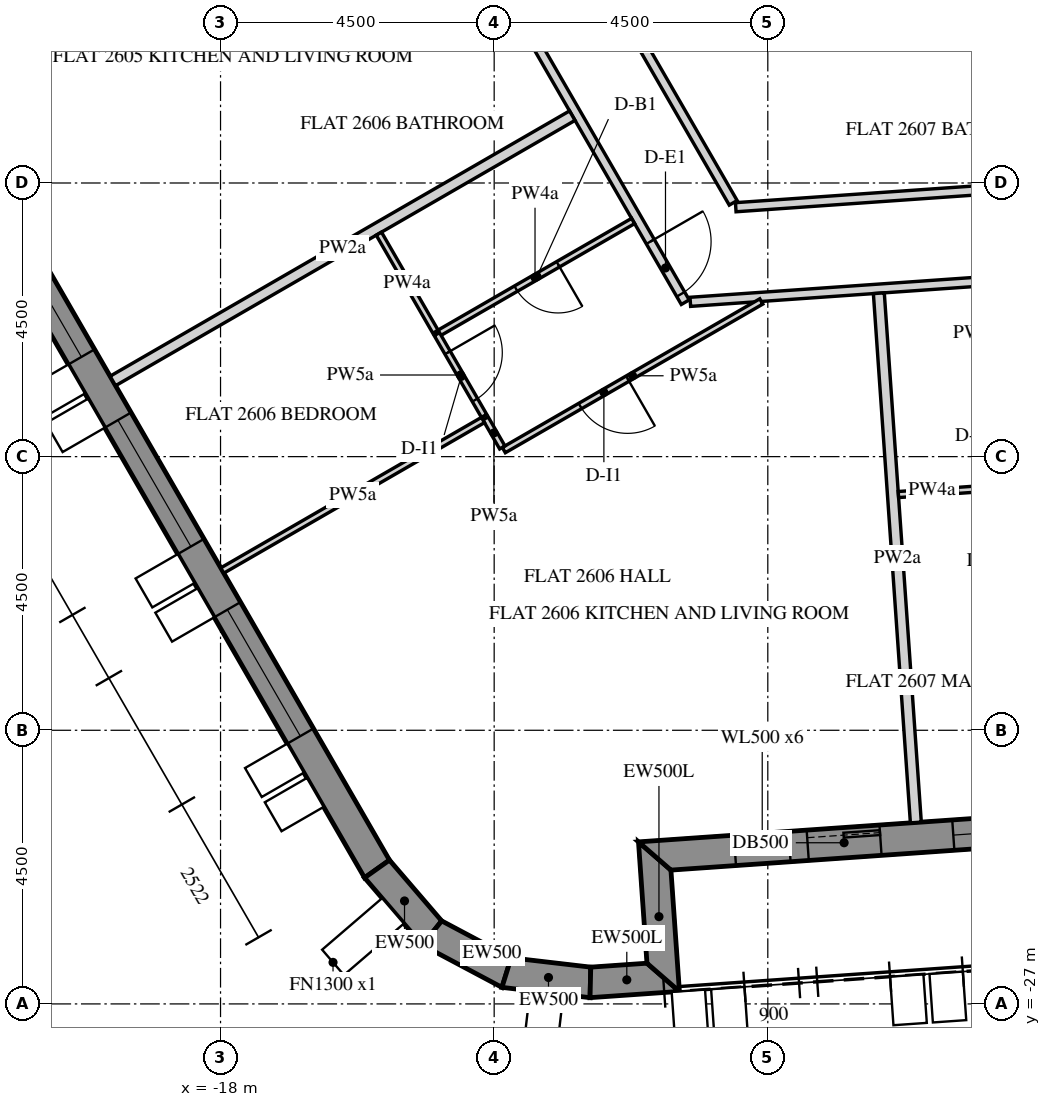
"""IFC4 building model, lengths in metres.
Left out: names, types, materials, properties, quantities, classifications, styles, units other than length and angle.
Written with IfcOpenShell. Run it as: python <this file> out.ifc"""

import sys

from ifc_helpers import new_model, si_unit, direction, frame, frame_2d, origin, place, context, subcontext, project, spatial, polyline, rectangle, outline, extrude, element, fill, save


model = new_model("IFC4")
c1 = context("Model", 3, precision=1e-05, world=origin(), true_north=direction((0.0, 1.0)))
c2 = subcontext(c1, "Body", "Model", "MODEL_VIEW")
j1 = project(units=[si_unit("LENGTHUNIT", "METRE"), si_unit("PLANEANGLEUNIT", "RADIAN")], contexts=[c1])
p1 = place(None, origin())
s1 = spatial("IfcSite", under=j1, at=p1, CompositionType="ELEMENT")
p2 = place(p1, origin())
s2 = spatial("IfcBuilding", under=s1, at=p2, CompositionType="ELEMENT")
p3 = place(p2, frame((0.0, 0.0, 326.4)))
s3 = spatial("IfcBuildingStorey", under=s2, at=p3, CompositionType="ELEMENT", Elevation=326.4)
p4 = place(p3, frame((-28.149, -2.745, -0.15), z_axis=(0.0, 0.0, 1.0), x_axis=(0.500003737743, -0.866023245787, 0.0)))
e1 = element("IfcWall", 1, at=p4, inside=s3, PredefinedType="SOLIDWALL", context=c2, shape_type="SweptSolid", body=[
    extrude(outline(polyline([(-0.021, -0.25), (25.468, -0.25), (25.421, 0.25), (0.021, 0.25), (-0.021, -0.25)])), origin(), (0.0, 0.0, 1.0), 3.9),
])
p5 = place(p4, frame((2.522, 0.0, 0.75)))
e2 = element("IfcOpeningElement", 2, at=p5, cuts=e1, PredefinedType="OPENING", context=c2, shape_type="SweptSolid", body=[
    extrude(rectangle(XDim=2.4, YDim=2.7, at=frame_2d((1.2, 1.35))), frame((0.0, 0.26, 0.0), z_axis=(0.0, -1.0, 0.0), x_axis=(1.0, 0.0, 0.0)), (0.0, 0.0, 1.0), 0.52),
])
p6 = place(p4, frame((6.122, 0.0, 0.75)))
e3 = element("IfcOpeningElement", 3, at=p6, cuts=e1, PredefinedType="OPENING", context=c2, shape_type="SweptSolid", body=[
    extrude(rectangle(XDim=2.4, YDim=2.7, at=frame_2d((1.2, 1.35))), frame((0.0, 0.26, 0.0), z_axis=(0.0, -1.0, 0.0), x_axis=(1.0, 0.0, 0.0)), (0.0, 0.0, 1.0), 0.52),
])
p7 = place(p4, frame((9.722, 0.0, 0.75)))
e4 = element("IfcOpeningElement", 4, at=p7, cuts=e1, PredefinedType="OPENING", context=c2, shape_type="SweptSolid", body=[
    extrude(rectangle(XDim=2.4, YDim=2.7, at=frame_2d((1.2, 1.35))), frame((0.0, 0.26, 0.0), z_axis=(0.0, -1.0, 0.0), x_axis=(1.0, 0.0, 0.0)), (0.0, 0.0, 1.0), 0.52),
])
p8 = place(p4, frame((13.323, 0.0, 0.75)))
e5 = element("IfcOpeningElement", 5, at=p8, cuts=e1, PredefinedType="OPENING", context=c2, shape_type="SweptSolid", body=[
    extrude(rectangle(XDim=2.4, YDim=2.7, at=frame_2d((1.2, 1.35))), frame((0.0, 0.26, 0.0), z_axis=(0.0, -1.0, 0.0), x_axis=(1.0, 0.0, 0.0)), (0.0, 0.0, 1.0), 0.52),
])
p9 = place(p4, frame((16.922, 0.0, 0.75)))
e6 = element("IfcOpeningElement", 6, at=p9, cuts=e1, PredefinedType="OPENING", context=c2, shape_type="SweptSolid", body=[
    extrude(rectangle(XDim=2.4, YDim=2.7, at=frame_2d((1.2, 1.35))), frame((0.0, 0.26, 0.0), z_axis=(0.0, -1.0, 0.0), x_axis=(1.0, 0.0, 0.0)), (0.0, 0.0, 1.0), 0.52),
])
p10 = place(p4, frame((20.522, 0.0, 0.75)))
e7 = element("IfcOpeningElement", 7, at=p10, cuts=e1, PredefinedType="OPENING", context=c2, shape_type="SweptSolid", body=[
    extrude(rectangle(XDim=2.4, YDim=2.7, at=frame_2d((1.2, 1.35))), frame((0.0, 0.26, 0.0), z_axis=(0.0, -1.0, 0.0), x_axis=(1.0, 0.0, 0.0)), (0.0, 0.0, 1.0), 0.52),
])
p11 = place(p3, frame((-15.427, -24.78, -0.15), z_axis=(0.0, 0.0, 1.0), x_axis=(0.651616566281, -0.758548515619, 0.0)))
e8 = element("IfcWall", 8, at=p11, inside=s3, PredefinedType="SOLIDWALL", context=c2, shape_type="SweptSolid", body=[
    extrude(outline(polyline([(-0.023, -0.25), (1.435, -0.25), (1.341, 0.25), (0.023, 0.25), (-0.023, -0.25)])), origin(), (0.0, 0.0, 1.0), 3.9),
])
p12 = place(p3, frame((-14.522, -25.833, -0.15), z_axis=(0.0, 0.0, 1.0), x_axis=(0.882926676147, -0.469510899286, 0.0)))
e9 = element("IfcWall", 9, at=p12, inside=s3, PredefinedType="SOLIDWALL", context=c2, shape_type="SweptSolid", body=[
    extrude(outline(polyline([(-0.047, -0.25), (1.436, -0.25), (1.341, 0.25), (0.047, 0.25), (-0.047, -0.25)])), origin(), (0.0, 0.0, 1.0), 3.9),
])
p13 = place(p3, frame((-13.296, -26.485, -0.15), z_axis=(0.0, 0.0, 1.0), x_axis=(0.993239161627, -0.116086036245, 0.0)))
e10 = element("IfcWall", 10, at=p13, inside=s3, PredefinedType="SOLIDWALL", context=c2, shape_type="SweptSolid", body=[
    extrude(outline(polyline([(-0.047, -0.25), (1.411, -0.25), (1.365, 0.25), (0.047, 0.25), (-0.047, -0.25)])), origin(), (0.0, 0.0, 1.0), 3.9),
])
p14 = place(p3, frame((-11.917, -26.646, -0.15), z_axis=(0.0, 0.0, 1.0), x_axis=(0.997562933087, 0.069772448216, 0.0)))
e11 = element("IfcWall", 11, at=p14, inside=s3, PredefinedType="SOLIDWALL", context=c2, shape_type="SweptSolid", body=[
    extrude(outline(polyline([(-0.023, -0.25), (1.45, -0.25), (0.95, 0.25), (0.023, 0.25), (-0.023, -0.25)])), origin(), (0.0, 0.0, 1.0), 3.9),
])
p15 = place(p3, frame((-10.72, -26.562, -0.15), z_axis=(0.0, 0.0, 1.0), x_axis=(-0.069824268692, 0.99755930726, 0.0)))
e12 = element("IfcWall", 12, at=p15, inside=s3, PredefinedType="SOLIDWALL", context=c2, shape_type="SweptSolid", body=[
    extrude(outline(polyline([(-0.25, -0.25), (1.75, -0.25), (2.25, 0.25), (0.25, 0.25), (-0.25, -0.25)])), origin(), (0.0, 0.0, 1.0), 3.9),
])
p16 = place(p3, frame((-10.86, -24.567, -0.15), z_axis=(0.0, 0.0, 1.0), x_axis=(0.997564329317, 0.06975248292, 0.0)))
e13 = element("IfcWall", 13, at=p16, inside=s3, PredefinedType="SOLIDWALL", context=c2, shape_type="SweptSolid", body=[
    extrude(outline(polyline([(0.25, -0.25), (22.795, -0.25), (23.295, 0.25), (-0.25, 0.25), (0.25, -0.25)])), origin(), (0.0, 0.0, 1.0), 3.9),
])
p17 = place(p16, frame((1.323, 0.0, 1.05)))
e14 = element("IfcOpeningElement", 14, at=p17, cuts=e13, PredefinedType="OPENING", context=c2, shape_type="SweptSolid", body=[
    extrude(rectangle(XDim=0.9, YDim=1.5, at=frame_2d((0.45, 0.75))), frame((0.0, 0.26, 0.0), z_axis=(0.0, -1.0, 0.0), x_axis=(1.0, 0.0, 0.0)), (0.0, 0.0, 1.0), 0.52),
])
p18 = place(p16, frame((2.522, 0.0, 0.15)))
e15 = element("IfcOpeningElement", 15, at=p18, cuts=e13, PredefinedType="OPENING", context=c2, shape_type="SweptSolid", body=[
    extrude(rectangle(XDim=1.2, YDim=2.4, at=frame_2d((0.6, 1.2))), frame((0.0, 0.26, 0.0), z_axis=(0.0, -1.0, 0.0), x_axis=(1.0, 0.0, 0.0)), (0.0, 0.0, 1.0), 0.52),
])
p19 = place(p16, frame((4.922, 0.0, 1.05)))
e16 = element("IfcOpeningElement", 16, at=p19, cuts=e13, PredefinedType="OPENING", context=c2, shape_type="SweptSolid", body=[
    extrude(rectangle(XDim=0.9, YDim=1.5, at=frame_2d((0.45, 0.75))), frame((0.0, 0.26, 0.0), z_axis=(0.0, -1.0, 0.0), x_axis=(1.0, 0.0, 0.0)), (0.0, 0.0, 1.0), 0.52),
])
p20 = place(p16, frame((6.122, 0.0, 0.15)))
e17 = element("IfcOpeningElement", 17, at=p20, cuts=e13, PredefinedType="OPENING", context=c2, shape_type="SweptSolid", body=[
    extrude(rectangle(XDim=1.2, YDim=2.4, at=frame_2d((0.6, 1.2))), frame((0.0, 0.26, 0.0), z_axis=(0.0, -1.0, 0.0), x_axis=(1.0, 0.0, 0.0)), (0.0, 0.0, 1.0), 0.52),
])
p21 = place(p16, frame((8.522, 0.0, 1.05)))
e18 = element("IfcOpeningElement", 18, at=p21, cuts=e13, PredefinedType="OPENING", context=c2, shape_type="SweptSolid", body=[
    extrude(rectangle(XDim=0.9, YDim=1.5, at=frame_2d((0.45, 0.75))), frame((0.0, 0.26, 0.0), z_axis=(0.0, -1.0, 0.0), x_axis=(1.0, 0.0, 0.0)), (0.0, 0.0, 1.0), 0.52),
])
p22 = place(p16, frame((9.722, 0.0, 0.15)))
e19 = element("IfcOpeningElement", 19, at=p22, cuts=e13, PredefinedType="OPENING", context=c2, shape_type="SweptSolid", body=[
    extrude(rectangle(XDim=1.2, YDim=2.4, at=frame_2d((0.6, 1.2))), frame((0.0, 0.26, 0.0), z_axis=(0.0, -1.0, 0.0), x_axis=(1.0, 0.0, 0.0)), (0.0, 0.0, 1.0), 0.52),
])
p23 = place(p16, frame((12.122, 0.0, 1.05)))
e20 = element("IfcOpeningElement", 20, at=p23, cuts=e13, PredefinedType="OPENING", context=c2, shape_type="SweptSolid", body=[
    extrude(rectangle(XDim=0.9, YDim=1.5, at=frame_2d((0.45, 0.75))), frame((0.0, 0.26, 0.0), z_axis=(0.0, -1.0, 0.0), x_axis=(1.0, 0.0, 0.0)), (0.0, 0.0, 1.0), 0.52),
])
p24 = place(p16, frame((13.323, 0.0, 0.15)))
e21 = element("IfcOpeningElement", 21, at=p24, cuts=e13, PredefinedType="OPENING", context=c2, shape_type="SweptSolid", body=[
    extrude(rectangle(XDim=1.2, YDim=2.4, at=frame_2d((0.6, 1.2))), frame((0.0, 0.26, 0.0), z_axis=(0.0, -1.0, 0.0), x_axis=(1.0, 0.0, 0.0)), (0.0, 0.0, 1.0), 0.52),
])
p25 = place(p16, frame((15.722, 0.0, 1.05)))
e22 = element("IfcOpeningElement", 22, at=p25, cuts=e13, PredefinedType="OPENING", context=c2, shape_type="SweptSolid", body=[
    extrude(rectangle(XDim=0.9, YDim=1.5, at=frame_2d((0.45, 0.75))), frame((0.0, 0.26, 0.0), z_axis=(0.0, -1.0, 0.0), x_axis=(1.0, 0.0, 0.0)), (0.0, 0.0, 1.0), 0.52),
])
p26 = place(p16, frame((16.922, 0.0, 0.15)))
e23 = element("IfcOpeningElement", 23, at=p26, cuts=e13, PredefinedType="OPENING", context=c2, shape_type="SweptSolid", body=[
    extrude(rectangle(XDim=1.2, YDim=2.4, at=frame_2d((0.6, 1.2))), frame((0.0, 0.26, 0.0), z_axis=(0.0, -1.0, 0.0), x_axis=(1.0, 0.0, 0.0)), (0.0, 0.0, 1.0), 0.52),
])
p27 = place(p16, frame((19.323, 0.0, 1.05)))
e24 = element("IfcOpeningElement", 24, at=p27, cuts=e13, PredefinedType="OPENING", context=c2, shape_type="SweptSolid", body=[
    extrude(rectangle(XDim=0.9, YDim=1.5, at=frame_2d((0.45, 0.75))), frame((0.0, 0.26, 0.0), z_axis=(0.0, -1.0, 0.0), x_axis=(1.0, 0.0, 0.0)), (0.0, 0.0, 1.0), 0.52),
])
p28 = place(p16, frame((20.522, 0.0, 0.15)))
e25 = element("IfcOpeningElement", 25, at=p28, cuts=e13, PredefinedType="OPENING", context=c2, shape_type="SweptSolid", body=[
    extrude(rectangle(XDim=1.2, YDim=2.4, at=frame_2d((0.6, 1.2))), frame((0.0, 0.26, 0.0), z_axis=(0.0, -1.0, 0.0), x_axis=(1.0, 0.0, 0.0)), (0.0, 0.0, 1.0), 0.52),
])
p29 = place(p3, frame((-17.696, -2.749, 0.0), z_axis=(0.0, 0.0, 1.0), x_axis=(0.499997948852, -0.866026588012, 0.0)))
e26 = element("IfcWall", 26, at=p29, inside=s3, PredefinedType="PARTITIONING", context=c2, shape_type="SweptSolid", body=[
    extrude(rectangle(XDim=14.677, YDim=0.15, at=frame_2d((7.339, 0.0))), origin(), (0.0, 0.0, 1.0), 2.838),
])
p30 = place(p29, frame((0.4, 0.0, 0.0)))
e27 = element("IfcOpeningElement", 27, at=p30, cuts=e26, PredefinedType="OPENING", context=c2, shape_type="SweptSolid", body=[
    extrude(rectangle(XDim=1.0, YDim=2.1, at=frame_2d((0.5, 1.05))), frame((0.0, 0.085, 0.0), z_axis=(0.0, -1.0, 0.0), x_axis=(1.0, 0.0, 0.0)), (0.0, 0.0, 1.0), 0.17),
])
p31 = place(p29, frame((13.527, 0.0, 0.0)))
e28 = element("IfcOpeningElement", 28, at=p31, cuts=e26, PredefinedType="OPENING", context=c2, shape_type="SweptSolid", body=[
    extrude(rectangle(XDim=1.0, YDim=2.1, at=frame_2d((0.5, 1.05))), frame((0.0, 0.085, 0.0), z_axis=(0.0, -1.0, 0.0), x_axis=(1.0, 0.0, 0.0)), (0.0, 0.0, 1.0), 0.17),
])
p32 = place(p3, frame((-10.274, -15.454, 0.0), z_axis=(0.0, 0.0, 1.0), x_axis=(0.997563645223, 0.069762265797, 0.0)))
e29 = element("IfcWall", 29, at=p32, inside=s3, PredefinedType="PARTITIONING", context=c2, shape_type="SweptSolid", body=[
    extrude(rectangle(XDim=16.606, YDim=0.15, at=frame_2d((8.303, 0.0))), origin(), (0.0, 0.0, 1.0), 2.838),
])
p33 = place(p32, frame((6.103, 0.0, 0.0)))
e30 = element("IfcOpeningElement", 30, at=p33, cuts=e29, PredefinedType="OPENING", context=c2, shape_type="SweptSolid", body=[
    extrude(rectangle(XDim=1.0, YDim=2.1, at=frame_2d((0.5, 1.05))), frame((0.0, 0.085, 0.0), z_axis=(0.0, -1.0, 0.0), x_axis=(1.0, 0.0, 0.0)), (0.0, 0.0, 1.0), 0.17),
])
p34 = place(p3, frame((6.717, -12.762, 0.0), z_axis=(0.0, 0.0, 1.0), x_axis=(-0.99756375843, -0.069760646978, 0.0)))
e31 = element("IfcWall", 31, at=p34, inside=s3, PredefinedType="PARTITIONING", context=c2, shape_type="SweptSolid", body=[
    extrude(rectangle(XDim=16.284, YDim=0.15, at=frame_2d((8.142, 0.0))), origin(), (0.0, 0.0, 1.0), 2.838),
])
p35 = place(p34, frame((7.692, 0.0, 0.0)))
e32 = element("IfcOpeningElement", 32, at=p35, cuts=e31, PredefinedType="OPENING", context=c2, shape_type="SweptSolid", body=[
    extrude(rectangle(XDim=0.9, YDim=2.1, at=frame_2d((0.45, 1.05))), frame((0.0, 0.085, 0.0), z_axis=(0.0, -1.0, 0.0), x_axis=(1.0, 0.0, 0.0)), (0.0, 0.0, 1.0), 0.17),
])
p36 = place(p3, frame((-9.569, -13.826, 0.0), z_axis=(0.0, 0.0, 1.0), x_axis=(-0.500017101833, 0.866015529811, 0.0)))
e33 = element("IfcWall", 33, at=p36, inside=s3, PredefinedType="PARTITIONING", context=c2, shape_type="SweptSolid", body=[
    extrude(rectangle(XDim=6.168, YDim=0.15, at=frame_2d((3.084, 0.0))), origin(), (0.0, 0.0, 1.0), 2.838),
])
p37 = place(p3, frame((-19.771, -16.755, 0.0), z_axis=(0.0, 0.0, 1.0), x_axis=(0.866025292695, 0.500000192413, 0.0)))
e34 = element("IfcWall", 34, at=p37, inside=s3, PredefinedType="PARTITIONING", context=c2, shape_type="SweptSolid", body=[
    extrude(rectangle(XDim=8.725, YDim=0.18, at=frame_2d((4.363, 0.0))), origin(), (0.0, 0.0, 1.0), 2.838),
])
p38 = place(p3, frame((-9.107, -15.448, 0.0), z_axis=(0.0, 0.0, 1.0), x_axis=(-0.866025094983, -0.500000534859, 0.0)))
e35 = element("IfcWall", 35, at=p38, inside=s3, PredefinedType="PARTITIONING", context=c2, shape_type="SweptSolid", body=[
    extrude(rectangle(XDim=4.889, YDim=0.1, at=frame_2d((2.445, 0.0))), origin(), (0.0, 0.0, 1.0), 2.838),
])
p39 = place(p38, frame((2.539, 0.0, 0.0)))
e36 = element("IfcOpeningElement", 36, at=p39, cuts=e35, PredefinedType="OPENING", context=c2, shape_type="SweptSolid", body=[
    extrude(rectangle(XDim=0.9, YDim=2.1, at=frame_2d((0.45, 1.05))), frame((0.0, 0.06, 0.0), z_axis=(0.0, -1.0, 0.0), x_axis=(1.0, 0.0, 0.0)), (0.0, 0.0, 1.0), 0.12),
])
p40 = place(p3, frame((-13.366, -17.849, 0.0), z_axis=(0.0, 0.0, 1.0), x_axis=(-0.499850094852, 0.866111934265, 0.0)))
e37 = element("IfcWall", 37, at=p40, inside=s3, PredefinedType="PARTITIONING", context=c2, shape_type="SweptSolid", body=[
    extrude(rectangle(XDim=0.552, YDim=0.1, at=frame_2d((0.276, 0.0))), origin(), (0.0, 0.0, 1.0), 2.838),
])
p41 = place(p3, frame((-13.684, -17.398, 0.0), z_axis=(0.0, 0.0, 1.0), x_axis=(-0.866040211805, -0.499974350878, 0.0)))
e38 = element("IfcWall", 38, at=p41, inside=s3, PredefinedType="PARTITIONING", context=c2, shape_type="SweptSolid", body=[
    extrude(rectangle(XDim=4.95, YDim=0.1, at=frame_2d((2.475, 0.0))), origin(), (0.0, 0.0, 1.0), 2.838),
])
p42 = place(p3, frame((-6.565, -24.017, 0.0), z_axis=(0.0, 0.0, 1.0), x_axis=(-0.06975756604, 0.997563973878, 0.0)))
e39 = element("IfcWall", 39, at=p42, inside=s3, PredefinedType="PARTITIONING", context=c2, shape_type="SweptSolid", body=[
    extrude(rectangle(XDim=8.725, YDim=0.18, at=frame_2d((4.363, 0.0))), origin(), (0.0, 0.0, 1.0), 2.838),
])
p43 = place(p3, frame((-11.215, -14.125, 0.0), z_axis=(0.0, 0.0, 1.0), x_axis=(-0.866028424924, -0.499994767197, 0.0)))
e40 = element("IfcWall", 40, at=p43, inside=s3, PredefinedType="PARTITIONING", context=c2, shape_type="SweptSolid", body=[
    extrude(rectangle(XDim=3.725, YDim=0.1, at=frame_2d((1.863, 0.0))), origin(), (0.0, 0.0, 1.0), 2.838),
])
p44 = place(p43, frame((1.425, 0.0, 0.0)))
e41 = element("IfcOpeningElement", 41, at=p44, cuts=e40, PredefinedType="OPENING", context=c2, shape_type="SweptSolid", body=[
    extrude(rectangle(XDim=0.8, YDim=2.1, at=frame_2d((0.4, 1.05))), frame((0.0, 0.06, 0.0), z_axis=(0.0, -1.0, 0.0), x_axis=(1.0, 0.0, 0.0)), (0.0, 0.0, 1.0), 0.12),
])
p45 = place(p3, frame((-14.442, -15.986, 0.0), z_axis=(0.0, 0.0, 1.0), x_axis=(0.50008102322, -0.865978619952, 0.0)))
e42 = element("IfcWall", 42, at=p45, inside=s3, PredefinedType="PARTITIONING", context=c2, shape_type="SweptSolid", body=[
    extrude(rectangle(XDim=1.552, YDim=0.1, at=frame_2d((0.776, 0.0))), origin(), (0.0, 0.0, 1.0), 2.838),
])
p46 = place(p45, frame((0.352, 0.0, 0.0)))
e43 = element("IfcOpeningElement", 43, at=p46, cuts=e42, PredefinedType="OPENING", context=c2, shape_type="SweptSolid", body=[
    extrude(rectangle(XDim=0.9, YDim=2.1, at=frame_2d((0.45, 1.05))), frame((0.0, 0.06, 0.0), z_axis=(0.0, -1.0, 0.0), x_axis=(1.0, 0.0, 0.0)), (0.0, 0.0, 1.0), 0.12),
])
p47 = place(p3, frame((-15.396, -14.333, 0.0), z_axis=(0.0, 0.0, 1.0), x_axis=(0.500115926523, -0.865958463229, 0.0)))
e44 = element("IfcWall", 44, at=p47, inside=s3, PredefinedType="PARTITIONING", context=c2, shape_type="SweptSolid", body=[
    extrude(rectangle(XDim=1.862, YDim=0.1, at=frame_2d((0.931, 0.0))), origin(), (0.0, 0.0, 1.0), 2.838),
])
p48 = place(p3, frame((-6.852, -18.623, 0.0), z_axis=(0.0, 0.0, 1.0), x_axis=(0.997564079323, 0.069756058123, 0.0)))
e45 = element("IfcWall", 45, at=p48, inside=s3, PredefinedType="PARTITIONING", context=c2, shape_type="SweptSolid", body=[
    extrude(rectangle(XDim=1.862, YDim=0.1, at=frame_2d((0.931, 0.0))), origin(), (0.0, 0.0, 1.0), 2.838),
])
p49 = place(p8, frame((0.0, 0.18, 0.0)))
e46 = element("IfcWindow", 46, at=p49, inside=s3, PartitioningType="DOUBLE_PANEL_VERTICAL", PredefinedType="WINDOW", context=c2, shape_type="SweptSolid", body=[
    extrude(rectangle(XDim=2.4, YDim=2.7, at=frame_2d((1.2, 1.35))), frame((0.0, 0.03, 0.0), z_axis=(0.0, -1.0, 0.0), x_axis=(1.0, 0.0, 0.0)), (0.0, 0.0, 1.0), 0.06),
])
fill(e5, e46)
p50 = place(p9, frame((0.0, 0.18, 0.0)))
e47 = element("IfcWindow", 47, at=p50, inside=s3, PartitioningType="DOUBLE_PANEL_VERTICAL", PredefinedType="WINDOW", context=c2, shape_type="SweptSolid", body=[
    extrude(rectangle(XDim=2.4, YDim=2.7, at=frame_2d((1.2, 1.35))), frame((0.0, 0.03, 0.0), z_axis=(0.0, -1.0, 0.0), x_axis=(1.0, 0.0, 0.0)), (0.0, 0.0, 1.0), 0.06),
])
fill(e6, e47)
p51 = place(p10, frame((0.0, 0.18, 0.0)))
e48 = element("IfcWindow", 48, at=p51, inside=s3, PartitioningType="DOUBLE_PANEL_VERTICAL", PredefinedType="WINDOW", context=c2, shape_type="SweptSolid", body=[
    extrude(rectangle(XDim=2.4, YDim=2.7, at=frame_2d((1.2, 1.35))), frame((0.0, 0.03, 0.0), z_axis=(0.0, -1.0, 0.0), x_axis=(1.0, 0.0, 0.0)), (0.0, 0.0, 1.0), 0.06),
])
fill(e7, e48)
p52 = place(p17, frame((0.0, 0.18, 0.0)))
e49 = element("IfcWindow", 49, at=p52, inside=s3, PartitioningType="SINGLE_PANEL", PredefinedType="WINDOW", context=c2, shape_type="SweptSolid", body=[
    extrude(rectangle(XDim=0.9, YDim=1.5, at=frame_2d((0.45, 0.75))), frame((0.0, 0.03, 0.0), z_axis=(0.0, -1.0, 0.0), x_axis=(1.0, 0.0, 0.0)), (0.0, 0.0, 1.0), 0.06),
])
fill(e14, e49)
p53 = place(p18, frame((0.0, 0.175, 0.0)))
e50 = element("IfcDoor", 50, at=p53, inside=s3, OperationType="SLIDING_TO_LEFT", PredefinedType="DOOR", context=c2, shape_type="SweptSolid", body=[
    extrude(rectangle(XDim=1.2, YDim=2.4, at=frame_2d((0.6, 1.2))), frame((0.0, 0.025, 0.0), z_axis=(0.0, -1.0, 0.0), x_axis=(1.0, 0.0, 0.0)), (0.0, 0.0, 1.0), 0.05),
])
fill(e15, e50)
p54 = place(p19, frame((0.0, 0.18, 0.0)))
e51 = element("IfcWindow", 51, at=p54, inside=s3, PartitioningType="SINGLE_PANEL", PredefinedType="WINDOW", context=c2, shape_type="SweptSolid", body=[
    extrude(rectangle(XDim=0.9, YDim=1.5, at=frame_2d((0.45, 0.75))), frame((0.0, 0.03, 0.0), z_axis=(0.0, -1.0, 0.0), x_axis=(1.0, 0.0, 0.0)), (0.0, 0.0, 1.0), 0.06),
])
fill(e16, e51)
p55 = place(p31, origin())
e52 = element("IfcDoor", 52, at=p55, inside=s3, OperationType="SINGLE_SWING_LEFT", PredefinedType="DOOR", context=c2, shape_type="SweptSolid", body=[
    extrude(rectangle(XDim=1.0, YDim=2.1, at=frame_2d((0.5, 1.05))), frame((0.0, 0.025, 0.0), z_axis=(0.0, -1.0, 0.0), x_axis=(1.0, 0.0, 0.0)), (0.0, 0.0, 1.0), 0.05),
])
fill(e28, e52)
p56 = place(p44, origin())
e53 = element("IfcDoor", 53, at=p56, inside=s3, OperationType="SINGLE_SWING_RIGHT", PredefinedType="DOOR", context=c2, shape_type="SweptSolid", body=[
    extrude(rectangle(XDim=0.8, YDim=2.1, at=frame_2d((0.4, 1.05))), frame((0.0, 0.025, 0.0), z_axis=(0.0, -1.0, 0.0), x_axis=(1.0, 0.0, 0.0)), (0.0, 0.0, 1.0), 0.05),
])
fill(e41, e53)
p57 = place(p39, origin())
e54 = element("IfcDoor", 54, at=p57, inside=s3, OperationType="SINGLE_SWING_LEFT", PredefinedType="DOOR", context=c2, shape_type="SweptSolid", body=[
    extrude(rectangle(XDim=0.9, YDim=2.1, at=frame_2d((0.45, 1.05))), frame((0.0, 0.025, 0.0), z_axis=(0.0, -1.0, 0.0), x_axis=(1.0, 0.0, 0.0)), (0.0, 0.0, 1.0), 0.05),
])
fill(e36, e54)
p58 = place(p46, origin())
e55 = element("IfcDoor", 55, at=p58, inside=s3, OperationType="SINGLE_SWING_LEFT", PredefinedType="DOOR", context=c2, shape_type="SweptSolid", body=[
    extrude(rectangle(XDim=0.9, YDim=2.1, at=frame_2d((0.45, 1.05))), frame((0.0, 0.025, 0.0), z_axis=(0.0, -1.0, 0.0), x_axis=(1.0, 0.0, 0.0)), (0.0, 0.0, 1.0), 0.05),
])
fill(e43, e55)
save(model, sys.argv[1])
